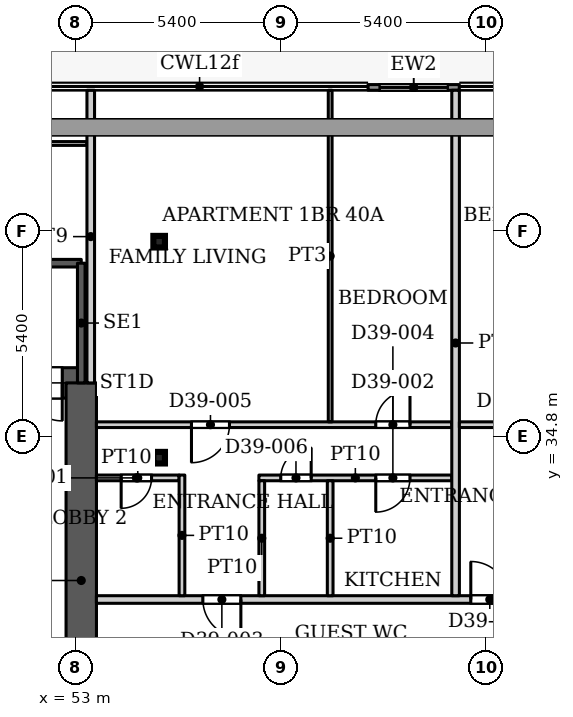
"""IFC4 building model, lengths in metres.
Left out: names, types, materials, properties, quantities, classifications, styles, units other than length and angle.
Written with IfcOpenShell. Run it as: python <this file> out.ifc"""

import sys

from ifc_helpers import new_model, si_unit, direction, frame, frame_2d, origin, origin_2d, place, context, subcontext, project, spatial, rectangle, hollow_rectangle, extrude, source, transform, mapped, element, fill, save


model = new_model("IFC4")
c1 = context("Model", 3, precision=1e-05, world=origin(), true_north=direction((0.0, 1.0)))
c2 = subcontext(c1, "Body", "Model", "MODEL_VIEW")
j1 = project(units=[si_unit("LENGTHUNIT", "METRE"), si_unit("PLANEANGLEUNIT", "RADIAN")], contexts=[c1])
p1 = place(None, origin())
s1 = spatial("IfcSite", under=j1, at=p1, CompositionType="ELEMENT")
p2 = place(p1, origin())
s2 = spatial("IfcBuilding", under=s1, at=p2, CompositionType="ELEMENT")
p3 = place(p2, frame((0.0, 0.0, 172.1)))
s3 = spatial("IfcBuildingStorey", under=s2, at=p3, CompositionType="ELEMENT", Elevation=172.1)
for number, where, z_axis, x_axis in (
    (1, (55.2, 34.232, 0.0), (0.0, 0.0, 1.0), (1.0, 0.0, 0.0)),
    (2, (55.2, 39.916, 0.0), (0.0, 0.0, 1.0), (1.0, 0.0, 0.0)),
):
    element("IfcColumn", number, at=place(p3, frame(where, z_axis=z_axis, x_axis=x_axis)), inside=s3, PredefinedType="COLUMN", context=c2, shape_type="SweptSolid", body=[
        extrude(hollow_rectangle(XDim=0.305, YDim=0.305, WallThickness=0.016, InnerFilletRadius=0.016, OuterFilletRadius=0.032, at=origin_2d()), origin(), (0.0, 0.0, 1.0), 3.9),
    ])
p4 = place(p3, frame((34.75, 36.2, 0.0), z_axis=(0.0, 0.0, 1.0), x_axis=(1.0, 0.0, 0.0)))
e3 = element("IfcWall", 3, at=p4, inside=s3, PredefinedType="SHEAR", context=c2, shape_type="SweptSolid", body=[
    extrude(rectangle(XDim=18.4, YDim=0.8, at=frame_2d((9.2, 0.0))), origin(), (0.0, 0.0, 1.0), 3.9),
])
p5 = place(p4, frame((16.9, 0.0, 0.0)))
e4 = element("IfcOpeningElement", 4, at=p5, cuts=e3, PredefinedType="OPENING", context=c2, shape_type="SweptSolid", body=[
    extrude(rectangle(XDim=1.0, YDim=2.2, at=frame_2d((0.5, 1.1))), frame((0.0, 0.41, 0.0), z_axis=(0.0, -1.0, 0.0), x_axis=(1.0, 0.0, 0.0)), (0.0, 0.0, 1.0), 0.82),
])
p6 = place(p3, frame((53.15, 25.8, 0.0), z_axis=(0.0, 0.0, 1.0), x_axis=(0.0, 1.0, 0.0)))
e5 = element("IfcWall", 5, at=p6, inside=s3, PredefinedType="SHEAR", context=c2, shape_type="SweptSolid", body=[
    extrude(rectangle(XDim=10.4, YDim=0.8, at=frame_2d((5.2, 0.0))), origin(), (0.0, 0.0, 1.0), 3.9),
])
p7 = place(p3, frame((60.697, 43.975, 0.0), z_axis=(0.0, 0.0, 1.0), x_axis=(1.0, 0.0, 0.0)))
e6 = element("IfcWall", 6, at=p7, inside=s3, PredefinedType="SOLIDWALL", context=c2, shape_type="SweptSolid", body=[
    extrude(rectangle(XDim=2.4, YDim=0.15, at=frame_2d((1.2, 0.0))), origin(), (0.0, 0.0, 1.0), 3.75),
])
p8 = place(p7, frame((0.3, 0.0, 0.0)))
e7 = element("IfcOpeningElement", 7, at=p8, cuts=e6, PredefinedType="OPENING", context=c2, shape_type="SweptSolid", body=[
    extrude(rectangle(XDim=1.8, YDim=2.4, at=frame_2d((0.9, 1.2))), frame((0.0, 0.085, 0.0), z_axis=(0.0, -1.0, 0.0), x_axis=(1.0, 0.0, 0.0)), (0.0, 0.0, 1.0), 0.17),
])
p9 = place(p3, frame((43.99, 39.35, 0.0), z_axis=(0.0, 0.0, 1.0), x_axis=(1.0, 0.0, 0.0)))
e8 = element("IfcWall", 8, at=p9, inside=s3, PredefinedType="SHEAR", context=c2, shape_type="SweptSolid", body=[
    extrude(rectangle(XDim=9.16, YDim=0.2, at=frame_2d((4.58, 0.0))), origin(), (0.0, 0.0, 1.0), 3.9),
])
p10 = place(p3, frame((53.15, 36.2, 0.0), z_axis=(0.0, 0.0, 1.0), x_axis=(0.0, 1.0, 0.0)))
e9 = element("IfcWall", 9, at=p10, inside=s3, PredefinedType="SHEAR", context=c2, shape_type="SweptSolid", body=[
    extrude(rectangle(XDim=3.15, YDim=0.2, at=frame_2d((1.575, 0.0))), origin(), (0.0, 0.0, 1.0), 3.9),
])
p11 = place(p3, frame((38.399, 42.5, 0.0), z_axis=(0.0, 0.0, 1.0), x_axis=(1.0, 0.0, 0.0)))
e10 = element("IfcWall", 10, at=p11, inside=s3, PredefinedType="PARTITIONING", context=c2, shape_type="SweptSolid", body=[
    extrude(rectangle(XDim=14.901, YDim=0.1, at=frame_2d((7.451, 0.0))), origin(), (0.0, 0.0, 1.0), 3.6),
])
p12 = place(p11, frame((6.801, 0.0, 0.0)))
e11 = element("IfcOpeningElement", 11, at=p12, cuts=e10, PredefinedType="OPENING", context=c2, shape_type="SweptSolid", body=[
    extrude(rectangle(XDim=1.0, YDim=2.1, at=frame_2d((0.5, 1.05))), frame((0.0, 0.06, 0.0), z_axis=(0.0, -1.0, 0.0), x_axis=(1.0, 0.0, 0.0)), (0.0, 0.0, 1.0), 0.12),
])
p13 = place(p3, frame((53.4, 36.199, 0.0), z_axis=(0.0, 0.0, 1.0), x_axis=(0.0, 1.0, 0.0)))
e12 = element("IfcWall", 12, at=p13, inside=s3, PredefinedType="PARTITIONING", context=c2, shape_type="SweptSolid", body=[
    extrude(rectangle(XDim=7.701, YDim=0.2, at=frame_2d((3.851, 0.0))), origin(), (0.0, 0.0, 1.0), 3.6),
])
p14 = place(p3, frame((53.549, 30.5, 0.0), z_axis=(0.0, 0.0, 1.0), x_axis=(1.0, 0.0, 0.0)))
e13 = element("IfcWall", 13, at=p14, inside=s3, PredefinedType="PARTITIONING", context=c2, shape_type="SweptSolid", body=[
    extrude(rectangle(XDim=39.151, YDim=0.2, at=frame_2d((19.575, 0.0))), origin(), (0.0, 0.0, 1.0), 3.6),
])
p15 = place(p14, frame((2.801, 0.0, 0.0)))
e14 = element("IfcOpeningElement", 14, at=p15, cuts=e13, PredefinedType="OPENING", context=c2, shape_type="SweptSolid", body=[
    extrude(rectangle(XDim=1.0, YDim=2.1, at=frame_2d((0.5, 1.05))), frame((0.0, 0.11, 0.0), z_axis=(0.0, -1.0, 0.0), x_axis=(1.0, 0.0, 0.0)), (0.0, 0.0, 1.0), 0.22),
])
p16 = place(p14, frame((9.851, 0.0, 0.0)))
e15 = element("IfcOpeningElement", 15, at=p16, cuts=e13, PredefinedType="OPENING", context=c2, shape_type="SweptSolid", body=[
    extrude(rectangle(XDim=1.0, YDim=2.1, at=frame_2d((0.5, 1.05))), frame((0.0, 0.11, 0.0), z_axis=(0.0, -1.0, 0.0), x_axis=(1.0, 0.0, 0.0)), (0.0, 0.0, 1.0), 0.22),
])
p17 = place(p14, frame((28.751, 0.0, 0.0)))
e16 = element("IfcOpeningElement", 16, at=p17, cuts=e13, PredefinedType="OPENING", context=c2, shape_type="SweptSolid", body=[
    extrude(rectangle(XDim=1.0, YDim=2.1, at=frame_2d((0.5, 1.05))), frame((0.0, 0.11, 0.0), z_axis=(0.0, -1.0, 0.0), x_axis=(1.0, 0.0, 0.0)), (0.0, 0.0, 1.0), 0.22),
])
p18 = place(p14, frame((32.651, 0.0, 0.0)))
e17 = element("IfcOpeningElement", 17, at=p18, cuts=e13, PredefinedType="OPENING", context=c2, shape_type="SweptSolid", body=[
    extrude(rectangle(XDim=1.0, YDim=2.1, at=frame_2d((0.5, 1.05))), frame((0.0, 0.11, 0.0), z_axis=(0.0, -1.0, 0.0), x_axis=(1.0, 0.0, 0.0)), (0.0, 0.0, 1.0), 0.22),
])
p19 = place(p3, frame((53.549, 33.7, 0.0), z_axis=(0.0, 0.0, 1.0), x_axis=(1.0, 0.0, 0.0)))
e18 = element("IfcWall", 18, at=p19, inside=s3, PredefinedType="PARTITIONING", context=c2, shape_type="SweptSolid", body=[
    extrude(rectangle(XDim=2.176, YDim=0.15, at=frame_2d((1.088, 0.0))), origin(), (0.0, 0.0, 1.0), 3.6),
])
p20 = place(p19, frame((0.651, 0.0, 0.0)))
e19 = element("IfcOpeningElement", 19, at=p20, cuts=e18, PredefinedType="OPENING", context=c2, shape_type="SweptSolid", body=[
    extrude(rectangle(XDim=0.8, YDim=2.1, at=frame_2d((0.4, 1.05))), frame((0.0, 0.085, 0.0), z_axis=(0.0, -1.0, 0.0), x_axis=(1.0, 0.0, 0.0)), (0.0, 0.0, 1.0), 0.17),
])
p21 = place(p3, frame((53.549, 35.1, 0.0), z_axis=(0.0, 0.0, 1.0), x_axis=(1.0, 0.0, 0.0)))
e20 = element("IfcWall", 20, at=p21, inside=s3, PredefinedType="PARTITIONING", context=c2, shape_type="SweptSolid", body=[
    extrude(rectangle(XDim=9.351, YDim=0.15, at=frame_2d((4.675, 0.0))), origin(), (0.0, 0.0, 1.0), 3.6),
])
p22 = place(p21, frame((7.351, 0.0, 0.0)))
e21 = element("IfcOpeningElement", 21, at=p22, cuts=e20, PredefinedType="OPENING", context=c2, shape_type="SweptSolid", body=[
    extrude(rectangle(XDim=0.9, YDim=2.1, at=frame_2d((0.45, 1.05))), frame((0.0, 0.085, 0.0), z_axis=(0.0, -1.0, 0.0), x_axis=(1.0, 0.0, 0.0)), (0.0, 0.0, 1.0), 0.17),
])
p23 = place(p21, frame((2.501, 0.0, 0.0)))
e22 = element("IfcOpeningElement", 22, at=p23, cuts=e20, PredefinedType="OPENING", context=c2, shape_type="SweptSolid", body=[
    extrude(rectangle(XDim=1.0, YDim=2.1, at=frame_2d((0.5, 1.05))), frame((0.0, 0.085, 0.0), z_axis=(0.0, -1.0, 0.0), x_axis=(1.0, 0.0, 0.0)), (0.0, 0.0, 1.0), 0.17),
])
p24 = place(p3, frame((55.8, 30.6, 0.0), z_axis=(0.0, 0.0, 1.0), x_axis=(0.0, 1.0, 0.0)))
e23 = element("IfcWall", 23, at=p24, inside=s3, PredefinedType="PARTITIONING", context=c2, shape_type="SweptSolid", body=[
    extrude(rectangle(XDim=3.175, YDim=0.15, at=frame_2d((1.587, 0.0))), origin(), (0.0, 0.0, 1.0), 3.6),
])
p25 = place(p3, frame((57.825, 33.7, 0.0), z_axis=(0.0, 0.0, 1.0), x_axis=(1.0, 0.0, 0.0)))
e24 = element("IfcWall", 24, at=p25, inside=s3, PredefinedType="PARTITIONING", context=c2, shape_type="SweptSolid", body=[
    extrude(rectangle(XDim=5.075, YDim=0.15, at=frame_2d((2.538, 0.0))), origin(), (0.0, 0.0, 1.0), 3.6),
])
p26 = place(p25, frame((3.075, 0.0, 0.0)))
e25 = element("IfcOpeningElement", 25, at=p26, cuts=e24, PredefinedType="OPENING", context=c2, shape_type="SweptSolid", body=[
    extrude(rectangle(XDim=0.9, YDim=2.1, at=frame_2d((0.45, 1.05))), frame((0.0, 0.085, 0.0), z_axis=(0.0, -1.0, 0.0), x_axis=(1.0, 0.0, 0.0)), (0.0, 0.0, 1.0), 0.17),
])
p27 = place(p25, frame((0.575, 0.0, 0.0)))
e26 = element("IfcOpeningElement", 26, at=p27, cuts=e24, PredefinedType="OPENING", context=c2, shape_type="SweptSolid", body=[
    extrude(rectangle(XDim=0.8, YDim=2.1, at=frame_2d((0.4, 1.05))), frame((0.0, 0.085, 0.0), z_axis=(0.0, -1.0, 0.0), x_axis=(1.0, 0.0, 0.0)), (0.0, 0.0, 1.0), 0.17),
])
for number, where, z_axis, x_axis in (
    (27, (57.9, 30.6, 0.0), (0.0, 0.0, 1.0), (0.0, 1.0, 0.0)),
    (28, (59.7, 30.6, 0.0), (0.0, 0.0, 1.0), (0.0, 1.0, 0.0)),
):
    element("IfcWall", number, at=place(p3, frame(where, z_axis=z_axis, x_axis=x_axis)), inside=s3, PredefinedType="PARTITIONING", context=c2, shape_type="SweptSolid", body=[
        extrude(rectangle(XDim=3.025, YDim=0.15, at=frame_2d((1.512, 0.0))), origin(), (0.0, 0.0, 1.0), 3.6),
    ])
p28 = place(p3, frame((59.7, 35.175, 0.0), z_axis=(0.0, 0.0, 1.0), x_axis=(0.0, 1.0, 0.0)))
e29 = element("IfcWall", 29, at=p28, inside=s3, PredefinedType="PARTITIONING", context=c2, shape_type="SweptSolid", body=[
    extrude(rectangle(XDim=8.725, YDim=0.1, at=frame_2d((4.362, 0.0))), origin(), (0.0, 0.0, 1.0), 3.6),
])
p29 = place(p3, frame((63.0, 30.6, 0.0), z_axis=(0.0, 0.0, 1.0), x_axis=(0.0, 1.0, 0.0)))
e30 = element("IfcWall", 30, at=p29, inside=s3, PredefinedType="PARTITIONING", context=c2, shape_type="SweptSolid", body=[
    extrude(rectangle(XDim=13.3, YDim=0.2, at=frame_2d((6.65, 0.0))), origin(), (0.0, 0.0, 1.0), 3.6),
])
p30 = place(p3, frame((63.1, 35.1, 0.0), z_axis=(0.0, 0.0, 1.0), x_axis=(1.0, 0.0, 0.0)))
e31 = element("IfcWall", 31, at=p30, inside=s3, PredefinedType="PARTITIONING", context=c2, shape_type="SweptSolid", body=[
    extrude(rectangle(XDim=12.1, YDim=0.15, at=frame_2d((6.05, 0.0))), origin(), (0.0, 0.0, 1.0), 3.6),
])
p31 = place(p30, frame((1.1, 0.0, 0.0)))
e32 = element("IfcOpeningElement", 32, at=p31, cuts=e31, PredefinedType="OPENING", context=c2, shape_type="SweptSolid", body=[
    extrude(rectangle(XDim=0.9, YDim=2.1, at=frame_2d((0.45, 1.05))), frame((0.0, 0.085, 0.0), z_axis=(0.0, -1.0, 0.0), x_axis=(1.0, 0.0, 0.0)), (0.0, 0.0, 1.0), 0.17),
])
p32 = place(p30, frame((5.1, 0.0, 0.0)))
e33 = element("IfcOpeningElement", 33, at=p32, cuts=e31, PredefinedType="OPENING", context=c2, shape_type="SweptSolid", body=[
    extrude(rectangle(XDim=1.0, YDim=2.1, at=frame_2d((0.5, 1.05))), frame((0.0, 0.085, 0.0), z_axis=(0.0, -1.0, 0.0), x_axis=(1.0, 0.0, 0.0)), (0.0, 0.0, 1.0), 0.17),
])
p33 = place(p30, frame((8.6, 0.0, 0.0)))
e34 = element("IfcOpeningElement", 34, at=p33, cuts=e31, PredefinedType="OPENING", context=c2, shape_type="SweptSolid", body=[
    extrude(rectangle(XDim=0.9, YDim=2.1, at=frame_2d((0.45, 1.05))), frame((0.0, 0.085, 0.0), z_axis=(0.0, -1.0, 0.0), x_axis=(1.0, 0.0, 0.0)), (0.0, 0.0, 1.0), 0.17),
])
m1 = source(origin(), c2, "Body", "SweptSolid", [
    extrude(rectangle(XDim=1.8, YDim=2.4, at=frame_2d((0.9, 1.2))), frame((0.0, 0.025, 0.0), z_axis=(0.0, -1.0, 0.0), x_axis=(1.0, 0.0, 0.0)), (0.0, 0.0, 1.0), 0.05),
])
p34 = place(p8, origin())
e35 = element("IfcDoor", 35, at=p34, inside=s3, OperationType="SLIDING_TO_LEFT", PredefinedType="DOOR", context=c2, shape_type="MappedRepresentation", body=[
    mapped(m1, transform((0.0, 0.0, 0.0), x_axis=(1.0, 0.0, 0.0), y_axis=(0.0, 1.0, 0.0), z_axis=(0.0, 0.0, 1.0), scale=1.0)),
])
fill(e7, e35)
m2 = source(origin(), c2, "Body", "SweptSolid", [
    extrude(rectangle(XDim=1.0, YDim=2.2, at=frame_2d((0.5, 1.1))), frame((0.0, 0.025, 0.0), z_axis=(0.0, -1.0, 0.0), x_axis=(1.0, 0.0, 0.0)), (0.0, 0.0, 1.0), 0.05),
])
p35 = place(p5, origin())
e36 = element("IfcDoor", 36, at=p35, inside=s3, OperationType="SINGLE_SWING_RIGHT", PredefinedType="DOOR", context=c2, shape_type="MappedRepresentation", body=[
    mapped(m2, transform((0.0, 0.0, 0.0), x_axis=(1.0, 0.0, 0.0), y_axis=(0.0, 1.0, 0.0), z_axis=(0.0, 0.0, 1.0), scale=1.0)),
])
fill(e4, e36)
m3 = source(origin(), c2, "Body", "SweptSolid", [
    extrude(rectangle(XDim=0.8, YDim=2.1, at=frame_2d((0.4, 1.05))), frame((0.0, 0.025, 0.0), z_axis=(0.0, -1.0, 0.0), x_axis=(1.0, 0.0, 0.0)), (0.0, 0.0, 1.0), 0.05),
])
p36 = place(p20, origin())
e37 = element("IfcDoor", 37, at=p36, inside=s3, OperationType="SINGLE_SWING_RIGHT", PredefinedType="DOOR", context=c2, shape_type="MappedRepresentation", body=[
    mapped(m3, transform((0.0, 0.0, 0.0), x_axis=(1.0, 0.0, 0.0), y_axis=(0.0, 1.0, 0.0), z_axis=(0.0, 0.0, 1.0), scale=1.0)),
])
fill(e19, e37)
m4 = source(origin(), c2, "Body", "SweptSolid", [
    extrude(rectangle(XDim=0.9, YDim=2.1, at=frame_2d((0.45, 1.05))), frame((0.0, 0.025, 0.0), z_axis=(0.0, -1.0, 0.0), x_axis=(1.0, 0.0, 0.0)), (0.0, 0.0, 1.0), 0.05),
])
p37 = place(p22, origin())
e38 = element("IfcDoor", 38, at=p37, inside=s3, OperationType="SINGLE_SWING_LEFT", PredefinedType="DOOR", context=c2, shape_type="MappedRepresentation", body=[
    mapped(m4, transform((0.0, 0.0, 0.0), x_axis=(1.0, 0.0, 0.0), y_axis=(0.0, 1.0, 0.0), z_axis=(0.0, 0.0, 1.0), scale=1.0)),
])
fill(e21, e38)
m5 = source(origin(), c2, "Body", "SweptSolid", [
    extrude(rectangle(XDim=1.0, YDim=2.1, at=frame_2d((0.5, 1.05))), frame((0.0, 0.025, 0.0), z_axis=(0.0, -1.0, 0.0), x_axis=(1.0, 0.0, 0.0)), (0.0, 0.0, 1.0), 0.05),
])
p38 = place(p15, origin())
e39 = element("IfcDoor", 39, at=p38, inside=s3, OperationType="SINGLE_SWING_RIGHT", PredefinedType="DOOR", context=c2, shape_type="MappedRepresentation", body=[
    mapped(m5, transform((0.0, 0.0, 0.0), x_axis=(1.0, 0.0, 0.0), y_axis=(0.0, 1.0, 0.0), z_axis=(0.0, 0.0, 1.0), scale=1.0)),
])
fill(e14, e39)
p39 = place(p26, origin())
e40 = element("IfcDoor", 40, at=p39, inside=s3, OperationType="SINGLE_SWING_RIGHT", PredefinedType="DOOR", context=c2, shape_type="MappedRepresentation", body=[
    mapped(m4, transform((0.0, 0.0, 0.0), x_axis=(1.0, 0.0, 0.0), y_axis=(0.0, 1.0, 0.0), z_axis=(0.0, 0.0, 1.0), scale=1.0)),
])
fill(e25, e40)
m6 = source(origin(), c2, "Body", "SweptSolid", [
    extrude(rectangle(XDim=1.0, YDim=2.1, at=frame_2d((0.5, 1.05))), frame((0.0, 0.025, 0.0), z_axis=(0.0, -1.0, 0.0), x_axis=(1.0, 0.0, 0.0)), (0.0, 0.0, 1.0), 0.05),
])
p40 = place(p23, origin())
e41 = element("IfcDoor", 41, at=p40, inside=s3, OperationType="SINGLE_SWING_RIGHT", PredefinedType="DOOR", context=c2, shape_type="MappedRepresentation", body=[
    mapped(m6, transform((0.0, 0.0, 0.0), x_axis=(1.0, 0.0, 0.0), y_axis=(0.0, 1.0, 0.0), z_axis=(0.0, 0.0, 1.0), scale=1.0)),
])
fill(e22, e41)
p41 = place(p27, origin())
e42 = element("IfcDoor", 42, at=p41, inside=s3, OperationType="SINGLE_SWING_LEFT", PredefinedType="DOOR", context=c2, shape_type="MappedRepresentation", body=[
    mapped(m3, transform((0.0, 0.0, 0.0), x_axis=(1.0, 0.0, 0.0), y_axis=(0.0, 1.0, 0.0), z_axis=(0.0, 0.0, 1.0), scale=1.0)),
])
fill(e26, e42)
p42 = place(p16, origin())
e43 = element("IfcDoor", 43, at=p42, inside=s3, OperationType="SINGLE_SWING_LEFT", PredefinedType="DOOR", context=c2, shape_type="MappedRepresentation", body=[
    mapped(m5, transform((0.0, 0.0, 0.0), x_axis=(1.0, 0.0, 0.0), y_axis=(0.0, 1.0, 0.0), z_axis=(0.0, 0.0, 1.0), scale=1.0)),
])
fill(e15, e43)
save(model, sys.argv[1])
